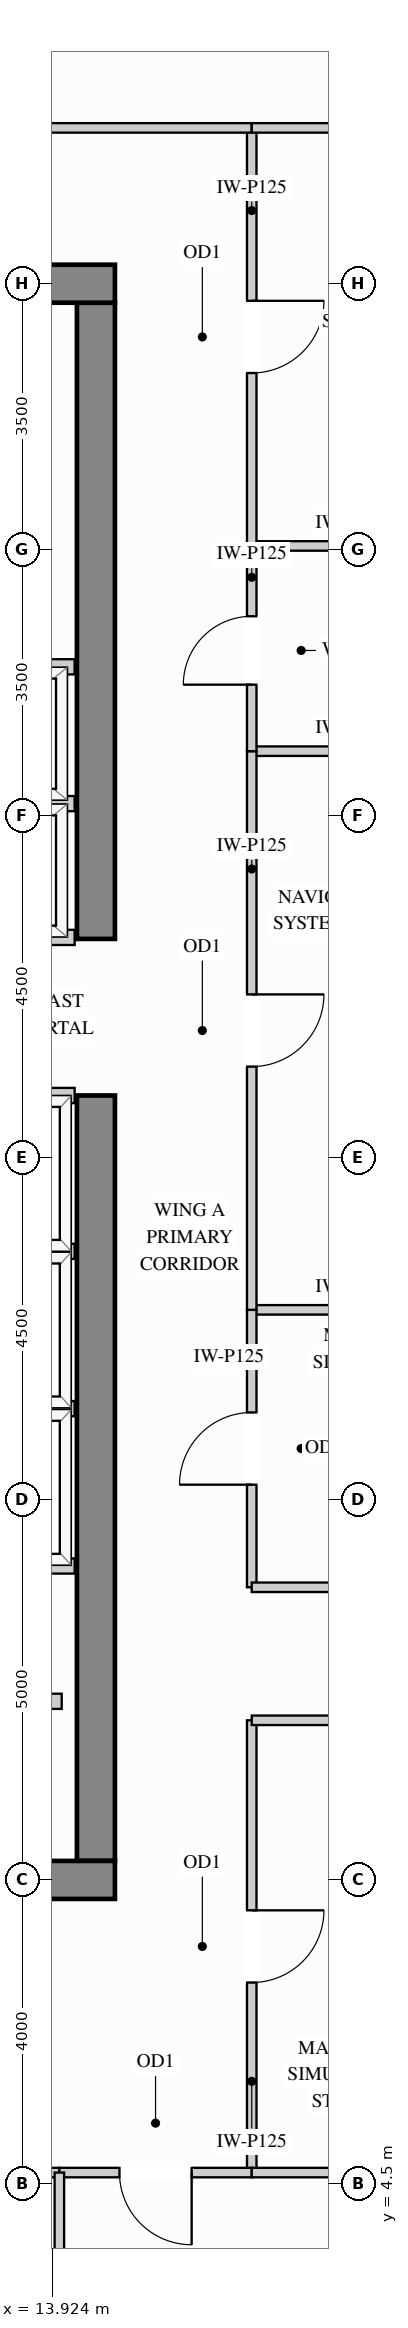
"""IFC4 building model, lengths in metres.
Left out: names, types, materials, properties, quantities, classifications, styles, units other than length and angle.
Written with IfcOpenShell. Run it as: python <this file> out.ifc"""

import sys

from ifc_helpers import new_model, si_unit, direction, frame, frame_2d, origin, place, context, subcontext, project, spatial, rectangle, extrude, source, transform, mapped, element, fill, save


model = new_model("IFC4")
c1 = context("Model", 3, precision=1e-05, world=origin(), true_north=direction((0.0, 1.0)))
c2 = subcontext(c1, "Body", "Model", "MODEL_VIEW")
j1 = project(units=[si_unit("LENGTHUNIT", "METRE"), si_unit("PLANEANGLEUNIT", "RADIAN")], contexts=[c1])
p1 = place(None, origin())
s1 = spatial("IfcSite", under=j1, at=p1, CompositionType="ELEMENT")
p2 = place(p1, origin())
s2 = spatial("IfcBuilding", under=s1, at=p2, CompositionType="ELEMENT")
p3 = place(p2, frame((0.0, 0.0, 212.4)))
s3 = spatial("IfcBuildingStorey", under=s2, at=p3, CompositionType="ELEMENT", Elevation=212.4)
m1 = source(origin(), c2, "Body", "SweptSolid", [
    extrude(rectangle(XDim=10.07, YDim=0.5, at=frame_2d((5.035, 0.0))), origin(), (0.0, 0.0, 1.0), 3.4),
])
p4 = place(p3, frame((14.5, 8.75, 0.0), z_axis=(0.0, 0.0, 1.0), x_axis=(0.0, 1.0, 0.0)))
e1 = element("IfcWall", 1, at=p4, inside=s3, PredefinedType="SHEAR", context=c2, shape_type="MappedRepresentation", body=[
    mapped(m1, transform((0.0, 0.0, 0.0), x_axis=(1.0, 0.0, 0.0), y_axis=(0.0, 1.0, 0.0), z_axis=(0.0, 0.0, 1.0))),
])
m2 = source(origin(), c2, "Body", "SweptSolid", [
    extrude(rectangle(XDim=8.37, YDim=0.5, at=frame_2d((4.185, 0.0))), origin(), (0.0, 0.0, 1.0), 3.4),
])
p5 = place(p3, frame((14.5, 20.88, 0.0), z_axis=(0.0, 0.0, 1.0), x_axis=(0.0, 1.0, 0.0)))
e2 = element("IfcWall", 2, at=p5, inside=s3, PredefinedType="SHEAR", context=c2, shape_type="MappedRepresentation", body=[
    mapped(m2, transform((0.0, 0.0, 0.0), x_axis=(1.0, 0.0, 0.0), y_axis=(0.0, 1.0, 0.0), z_axis=(0.0, 0.0, 1.0))),
])
m3 = source(origin(), c2, "Body", "SweptSolid", [
    extrude(rectangle(XDim=10.5, YDim=0.5, at=frame_2d((5.25, 0.0))), origin(), (0.0, 0.0, 1.0), 3.4),
])
for number, where, z_axis, x_axis in (
    (3, (4.25, 29.5, 0.0), (0.0, 0.0, 1.0), (1.0, 0.0, 0.0)),
    (4, (4.25, 8.5, 0.0), (0.0, 0.0, 1.0), (1.0, 0.0, 0.0)),
):
    element("IfcWall", number, at=place(p3, frame(where, z_axis=z_axis, x_axis=x_axis)), inside=s3, PredefinedType="SHEAR", context=c2, shape_type="MappedRepresentation", body=[
        mapped(m3, transform((0.0, 0.0, 0.0), x_axis=(1.0, 0.0, 0.0), y_axis=(0.0, 1.0, 0.0), z_axis=(0.0, 0.0, 1.0))),
    ])
m4 = source(origin(), c2, "Body", "SweptSolid", [
    extrude(rectangle(XDim=2.6, YDim=0.125, at=frame_2d((1.3, 0.0))), origin(), (0.0, 0.0, 1.0), 3.385),
])
p6 = place(p3, frame((16.55, 16.0, 0.0), z_axis=(0.0, 0.0, 1.0), x_axis=(1.0, 0.0, 0.0)))
e5 = element("IfcWall", 5, at=p6, inside=s3, PredefinedType="PARTITIONING", context=c2, shape_type="MappedRepresentation", body=[
    mapped(m4, transform((0.0, 0.0, 0.0), x_axis=(1.0, 0.0, 0.0), y_axis=(0.0, 1.0, 0.0), z_axis=(0.0, 0.0, 1.0))),
])
m5 = source(origin(), c2, "Body", "SweptSolid", [
    extrude(rectangle(XDim=2.598, YDim=0.125, at=frame_2d((1.299, 0.0))), origin(), (0.0, 0.0, 1.0), 3.385),
])
for number, where, z_axis, x_axis in (
    (6, (16.55, 23.35, 0.0), (0.0, 0.0, 1.0), (1.0, 0.0, 0.0)),
    (7, (16.55, 26.05, 0.0), (0.0, 0.0, 1.0), (1.0, 0.0, 0.0)),
):
    element("IfcWall", number, at=place(p3, frame(where, z_axis=z_axis, x_axis=x_axis)), inside=s3, PredefinedType="PARTITIONING", context=c2, shape_type="MappedRepresentation", body=[
        mapped(m5, transform((0.0, 0.0, 0.0), x_axis=(1.0, 0.0, 0.0), y_axis=(0.0, 1.0, 0.0), z_axis=(0.0, 0.0, 1.0))),
    ])
p7 = place(p3, frame((16.55, 12.35, 0.0), z_axis=(0.0, 0.0, 1.0), x_axis=(0.0, 1.0, 0.0)))
e8 = element("IfcWall", 8, at=p7, inside=s3, PredefinedType="PARTITIONING", context=c2, shape_type="SweptSolid", body=[
    extrude(rectangle(XDim=3.65, YDim=0.125, at=frame_2d((1.825, 0.0))), origin(), (0.0, 0.0, 1.0), 3.385),
])
p8 = place(p7, frame((1.35, 0.0, 0.0)))
e9 = element("IfcOpeningElement", 9, at=p8, cuts=e8, PredefinedType="OPENING", context=c2, shape_type="SweptSolid", body=[
    extrude(rectangle(XDim=0.95, YDim=2.15, at=frame_2d((0.475, 1.075))), frame((0.0, 0.073, 0.0), z_axis=(0.0, -1.0, 0.0), x_axis=(1.0, 0.0, 0.0)), (0.0, 0.0, 1.0), 0.145),
])
p9 = place(p3, frame((16.55, 16.0, 0.0), z_axis=(0.0, 0.0, 1.0), x_axis=(0.0, 1.0, 0.0)))
e10 = element("IfcWall", 10, at=p9, inside=s3, PredefinedType="PARTITIONING", context=c2, shape_type="SweptSolid", body=[
    extrude(rectangle(XDim=7.35, YDim=0.125, at=frame_2d((3.675, 0.0))), origin(), (0.0, 0.0, 1.0), 3.385),
])
p10 = place(p9, frame((3.2, 0.0, 0.0)))
e11 = element("IfcOpeningElement", 11, at=p10, cuts=e10, PredefinedType="OPENING", context=c2, shape_type="SweptSolid", body=[
    extrude(rectangle(XDim=0.95, YDim=2.15, at=frame_2d((0.475, 1.075))), frame((0.0, 0.073, 0.0), z_axis=(0.0, -1.0, 0.0), x_axis=(1.0, 0.0, 0.0)), (0.0, 0.0, 1.0), 0.145),
])
p11 = place(p3, frame((16.55, 26.05, 0.0), z_axis=(0.0, 0.0, 1.0), x_axis=(0.0, 1.0, 0.0)))
e12 = element("IfcWall", 12, at=p11, inside=s3, PredefinedType="PARTITIONING", context=c2, shape_type="SweptSolid", body=[
    extrude(rectangle(XDim=5.5, YDim=0.125, at=frame_2d((2.75, 0.0))), origin(), (0.0, 0.0, 1.0), 3.385),
])
p12 = place(p11, frame((2.275, 0.0, 0.0)))
e13 = element("IfcOpeningElement", 13, at=p12, cuts=e12, PredefinedType="OPENING", context=c2, shape_type="SweptSolid", body=[
    extrude(rectangle(XDim=0.95, YDim=2.15, at=frame_2d((0.475, 1.075))), frame((0.0, 0.073, 0.0), z_axis=(0.0, -1.0, 0.0), x_axis=(1.0, 0.0, 0.0)), (0.0, 0.0, 1.0), 0.145),
])
p13 = place(p3, frame((16.55, 4.65, 0.0), z_axis=(0.0, 0.0, 1.0), x_axis=(0.0, 1.0, 0.0)))
e14 = element("IfcWall", 14, at=p13, inside=s3, PredefinedType="PARTITIONING", context=c2, shape_type="SweptSolid", body=[
    extrude(rectangle(XDim=5.95, YDim=0.125, at=frame_2d((2.975, 0.0))), origin(), (0.0, 0.0, 1.0), 3.385),
])
p14 = place(p13, frame((2.5, 0.0, 0.0)))
e15 = element("IfcOpeningElement", 15, at=p14, cuts=e14, PredefinedType="OPENING", context=c2, shape_type="SweptSolid", body=[
    extrude(rectangle(XDim=0.95, YDim=2.15, at=frame_2d((0.475, 1.075))), frame((0.0, 0.073, 0.0), z_axis=(0.0, -1.0, 0.0), x_axis=(1.0, 0.0, 0.0)), (0.0, 0.0, 1.0), 0.145),
])
p15 = place(p3, frame((16.55, 23.35, 0.0), z_axis=(0.0, 0.0, 1.0), x_axis=(0.0, 1.0, 0.0)))
e16 = element("IfcWall", 16, at=p15, inside=s3, PredefinedType="PARTITIONING", context=c2, shape_type="SweptSolid", body=[
    extrude(rectangle(XDim=2.7, YDim=0.125, at=frame_2d((1.35, 0.0))), origin(), (0.0, 0.0, 1.0), 3.385),
])
p16 = place(p15, frame((0.875, 0.0, 0.0)))
e17 = element("IfcOpeningElement", 17, at=p16, cuts=e16, PredefinedType="OPENING", context=c2, shape_type="SweptSolid", body=[
    extrude(rectangle(XDim=0.9, YDim=2.15, at=frame_2d((0.45, 1.075))), frame((0.0, 0.073, 0.0), z_axis=(0.0, -1.0, 0.0), x_axis=(1.0, 0.0, 0.0)), (0.0, 0.0, 1.0), 0.145),
])
p17 = place(p3, frame((2.45, 31.55, 0.0), z_axis=(0.0, 0.0, 1.0), x_axis=(1.0, 0.0, 0.0)))
e18 = element("IfcWall", 18, at=p17, inside=s3, PredefinedType="PARTITIONING", context=c2, shape_type="SweptSolid", body=[
    extrude(rectangle(XDim=14.1, YDim=0.125, at=frame_2d((7.05, 0.0))), origin(), (0.0, 0.0, 1.0), 3.385),
])
p18 = place(p17, frame((6.575, 0.0, 0.0)))
e19 = element("IfcOpeningElement", 19, at=p18, cuts=e18, PredefinedType="OPENING", context=c2, shape_type="SweptSolid", body=[
    extrude(rectangle(XDim=0.95, YDim=2.15, at=frame_2d((0.475, 1.075))), frame((0.0, 0.073, 0.0), z_axis=(0.0, -1.0, 0.0), x_axis=(1.0, 0.0, 0.0)), (0.0, 0.0, 1.0), 0.145),
])
p19 = place(p3, frame((16.55, 31.55, 0.0), z_axis=(0.0, 0.0, 1.0), x_axis=(1.0, 0.0, 0.0)))
e20 = element("IfcWall", 20, at=p19, inside=s3, PredefinedType="PARTITIONING", context=c2, shape_type="MappedRepresentation", body=[
    mapped(m5, transform((0.0, 0.0, 0.0), x_axis=(1.0, 0.0, 0.0), y_axis=(0.0, 1.0, 0.0), z_axis=(0.0, 0.0, 1.0))),
])
m6 = source(origin(), c2, "Body", "SweptSolid", [
    extrude(rectangle(XDim=2.95, YDim=0.125, at=frame_2d((1.475, 0.0))), origin(), (0.0, 0.0, 1.0), 3.385),
])
for number, where, z_axis, x_axis in (
    (21, (16.55, 12.35, 0.0), (0.0, 0.0, 1.0), (1.0, 0.0, 0.0)),
    (22, (16.55, 10.6, 0.0), (0.0, 0.0, 1.0), (1.0, 0.0, 0.0)),
):
    element("IfcWall", number, at=place(p3, frame(where, z_axis=z_axis, x_axis=x_axis)), inside=s3, PredefinedType="PARTITIONING", context=c2, shape_type="MappedRepresentation", body=[
        mapped(m6, transform((0.0, 0.0, 0.0), x_axis=(1.0, 0.0, 0.0), y_axis=(0.0, 1.0, 0.0), z_axis=(0.0, 0.0, 1.0))),
    ])
p20 = place(p3, frame((8.227, 4.65, 0.0), z_axis=(0.0, 0.0, 1.0), x_axis=(1.0, 0.0, 0.0)))
e23 = element("IfcWall", 23, at=p20, inside=s3, PredefinedType="PARTITIONING", context=c2, shape_type="SweptSolid", body=[
    extrude(rectangle(XDim=5.792, YDim=0.125, at=frame_2d((2.896, 0.0))), origin(), (0.0, 0.0, 1.0), 2.848),
])
p21 = place(p20, frame((2.421, 0.0, 0.0)))
e24 = element("IfcOpeningElement", 24, at=p21, cuts=e23, PredefinedType="OPENING", context=c2, shape_type="SweptSolid", body=[
    extrude(rectangle(XDim=0.95, YDim=2.15, at=frame_2d((0.475, 1.075))), frame((0.0, 0.073, 0.0), z_axis=(0.0, -1.0, 0.0), x_axis=(1.0, 0.0, 0.0)), (0.0, 0.0, 1.0), 0.145),
])
p22 = place(p3, frame((14.019, 4.65, 0.0), z_axis=(0.0, 0.0, 1.0), x_axis=(1.0, 0.0, 0.0)))
e25 = element("IfcWall", 25, at=p22, inside=s3, PredefinedType="PARTITIONING", context=c2, shape_type="SweptSolid", body=[
    extrude(rectangle(XDim=2.531, YDim=0.125, at=frame_2d((1.266, 0.0))), origin(), (0.0, 0.0, 1.0), 2.848),
])
p23 = place(p22, frame((0.791, 0.0, 0.0)))
e26 = element("IfcOpeningElement", 26, at=p23, cuts=e25, PredefinedType="OPENING", context=c2, shape_type="SweptSolid", body=[
    extrude(rectangle(XDim=0.95, YDim=2.15, at=frame_2d((0.475, 1.075))), frame((0.0, 0.073, 0.0), z_axis=(0.0, -1.0, 0.0), x_axis=(1.0, 0.0, 0.0)), (0.0, 0.0, 1.0), 0.145),
])
m7 = source(origin(), c2, "Body", "SweptSolid", [
    extrude(rectangle(XDim=2.6, YDim=0.125, at=frame_2d((1.3, 0.0))), origin(), (0.0, 0.0, 1.0), 2.848),
])
p24 = place(p3, frame((16.55, 4.65, 0.0), z_axis=(0.0, 0.0, 1.0), x_axis=(1.0, 0.0, 0.0)))
e27 = element("IfcWall", 27, at=p24, inside=s3, PredefinedType="PARTITIONING", context=c2, shape_type="MappedRepresentation", body=[
    mapped(m7, transform((0.0, 0.0, 0.0), x_axis=(1.0, 0.0, 0.0), y_axis=(0.0, 1.0, 0.0), z_axis=(0.0, 0.0, 1.0))),
])
m8 = source(origin(), c2, "Body", "SweptSolid", [
    extrude(rectangle(XDim=4.298, YDim=0.125, at=frame_2d((2.149, 0.0))), origin(), (0.0, 0.0, 1.0), 3.385),
])
p25 = place(p3, frame((14.019, 0.352, 0.0), z_axis=(0.0, 0.0, 1.0), x_axis=(0.0, 1.0, 0.0)))
e28 = element("IfcWall", 28, at=p25, inside=s3, PredefinedType="PARTITIONING", context=c2, shape_type="MappedRepresentation", body=[
    mapped(m8, transform((0.0, 0.0, 0.0), x_axis=(1.0, 0.0, 0.0), y_axis=(0.0, 1.0, 0.0), z_axis=(0.0, 0.0, 1.0))),
])
m9 = source(origin(), c2, "Body", "SweptSolid", [
    extrude(rectangle(XDim=1.63, YDim=0.2, at=frame_2d((0.815, 0.0))), origin(), (0.0, 0.0, 1.0), 3.385),
])
p26 = place(p3, frame((12.42, 10.85, 0.0), z_axis=(0.0, 0.0, 1.0), x_axis=(1.0, 0.0, 0.0)))
e29 = element("IfcWall", 29, at=p26, inside=s3, PredefinedType="PARTITIONING", context=c2, shape_type="MappedRepresentation", body=[
    mapped(m9, transform((0.0, 0.0, 0.0), x_axis=(1.0, 0.0, 0.0), y_axis=(0.0, 1.0, 0.0), z_axis=(0.0, 0.0, 1.0))),
])
m10 = source(origin(), c2, "Body", "SweptSolid", [
    extrude(rectangle(XDim=2.39, YDim=0.2, at=frame_2d((1.195, 0.0))), origin(), (0.0, 0.0, 1.0), 3.385),
])
for number, where, z_axis, x_axis in (
    (30, (11.83, 22.66, 0.0), (0.0, 0.0, 1.0), (1.0, 0.0, 0.0)),
    (31, (11.83, 20.9, 0.0), (0.0, 0.0, 1.0), (1.0, 0.0, 0.0)),
    (32, (11.83, 24.46, 0.0), (0.0, 0.0, 1.0), (1.0, 0.0, 0.0)),
):
    element("IfcWall", number, at=place(p3, frame(where, z_axis=z_axis, x_axis=x_axis)), inside=s3, PredefinedType="PARTITIONING", context=c2, shape_type="MappedRepresentation", body=[
        mapped(m10, transform((0.0, 0.0, 0.0), x_axis=(1.0, 0.0, 0.0), y_axis=(0.0, 1.0, 0.0), z_axis=(0.0, 0.0, 1.0))),
    ])
m11 = source(origin(), c2, "Body", "SweptSolid", [
    extrude(rectangle(XDim=1.99, YDim=0.2, at=frame_2d((0.995, 0.0))), origin(), (0.0, 0.0, 1.0), 3.385),
])
for number, where, z_axis, x_axis in (
    (33, (12.23, 14.7, 0.0), (0.0, 0.0, 1.0), (1.0, 0.0, 0.0)),
    (34, (12.23, 12.63, 0.0), (0.0, 0.0, 1.0), (1.0, 0.0, 0.0)),
    (35, (12.23, 16.77, 0.0), (0.0, 0.0, 1.0), (1.0, 0.0, 0.0)),
    (36, (12.23, 18.82, 0.0), (0.0, 0.0, 1.0), (1.0, 0.0, 0.0)),
):
    element("IfcWall", number, at=place(p3, frame(where, z_axis=z_axis, x_axis=x_axis)), inside=s3, PredefinedType="PARTITIONING", context=c2, shape_type="MappedRepresentation", body=[
        mapped(m11, transform((0.0, 0.0, 0.0), x_axis=(1.0, 0.0, 0.0), y_axis=(0.0, 1.0, 0.0), z_axis=(0.0, 0.0, 1.0))),
    ])
m12 = source(origin(), c2, "Body", "SweptSolid", [
    extrude(rectangle(XDim=0.95, YDim=2.15, at=frame_2d((0.475, 1.075))), frame((0.0, 0.025, 0.0), z_axis=(0.0, -1.0, 0.0), x_axis=(1.0, 0.0, 0.0)), (0.0, 0.0, 1.0), 0.05),
])
p27 = place(p14, origin())
e37 = element("IfcDoor", 37, at=p27, inside=s3, OperationType="SINGLE_SWING_RIGHT", PredefinedType="DOOR", context=c2, shape_type="MappedRepresentation", body=[
    mapped(m12, transform((0.0, 0.0, 0.0), x_axis=(1.0, 0.0, 0.0), y_axis=(0.0, 1.0, 0.0), z_axis=(0.0, 0.0, 1.0))),
])
fill(e15, e37)
p28 = place(p8, origin())
e38 = element("IfcDoor", 38, at=p28, inside=s3, OperationType="SINGLE_SWING_LEFT", PredefinedType="DOOR", context=c2, shape_type="MappedRepresentation", body=[
    mapped(m12, transform((0.0, 0.0, 0.0), x_axis=(1.0, 0.0, 0.0), y_axis=(0.0, 1.0, 0.0), z_axis=(0.0, 0.0, 1.0))),
])
fill(e9, e38)
p29 = place(p10, origin())
e39 = element("IfcDoor", 39, at=p29, inside=s3, OperationType="SINGLE_SWING_RIGHT", PredefinedType="DOOR", context=c2, shape_type="MappedRepresentation", body=[
    mapped(m12, transform((0.0, 0.0, 0.0), x_axis=(1.0, 0.0, 0.0), y_axis=(0.0, 1.0, 0.0), z_axis=(0.0, 0.0, 1.0))),
])
fill(e11, e39)
p30 = place(p12, origin())
e40 = element("IfcDoor", 40, at=p30, inside=s3, OperationType="SINGLE_SWING_RIGHT", PredefinedType="DOOR", context=c2, shape_type="MappedRepresentation", body=[
    mapped(m12, transform((0.0, 0.0, 0.0), x_axis=(1.0, 0.0, 0.0), y_axis=(0.0, 1.0, 0.0), z_axis=(0.0, 0.0, 1.0))),
])
fill(e13, e40)
p31 = place(p23, origin())
e41 = element("IfcDoor", 41, at=p31, inside=s3, OperationType="SINGLE_SWING_RIGHT", PredefinedType="DOOR", context=c2, shape_type="MappedRepresentation", body=[
    mapped(m12, transform((0.0, 0.0, 0.0), x_axis=(1.0, 0.0, 0.0), y_axis=(0.0, 1.0, 0.0), z_axis=(0.0, 0.0, 1.0))),
])
fill(e26, e41)
m13 = source(origin(), c2, "Body", "SweptSolid", [
    extrude(rectangle(XDim=0.9, YDim=2.15, at=frame_2d((0.45, 1.075))), frame((0.0, 0.025, 0.0), z_axis=(0.0, -1.0, 0.0), x_axis=(1.0, 0.0, 0.0)), (0.0, 0.0, 1.0), 0.05),
])
p32 = place(p16, origin())
e42 = element("IfcDoor", 42, at=p32, inside=s3, OperationType="SINGLE_SWING_LEFT", PredefinedType="DOOR", context=c2, shape_type="MappedRepresentation", body=[
    mapped(m13, transform((0.0, 0.0, 0.0), x_axis=(1.0, 0.0, 0.0), y_axis=(0.0, 1.0, 0.0), z_axis=(0.0, 0.0, 1.0))),
])
fill(e17, e42)
save(model, sys.argv[1])
